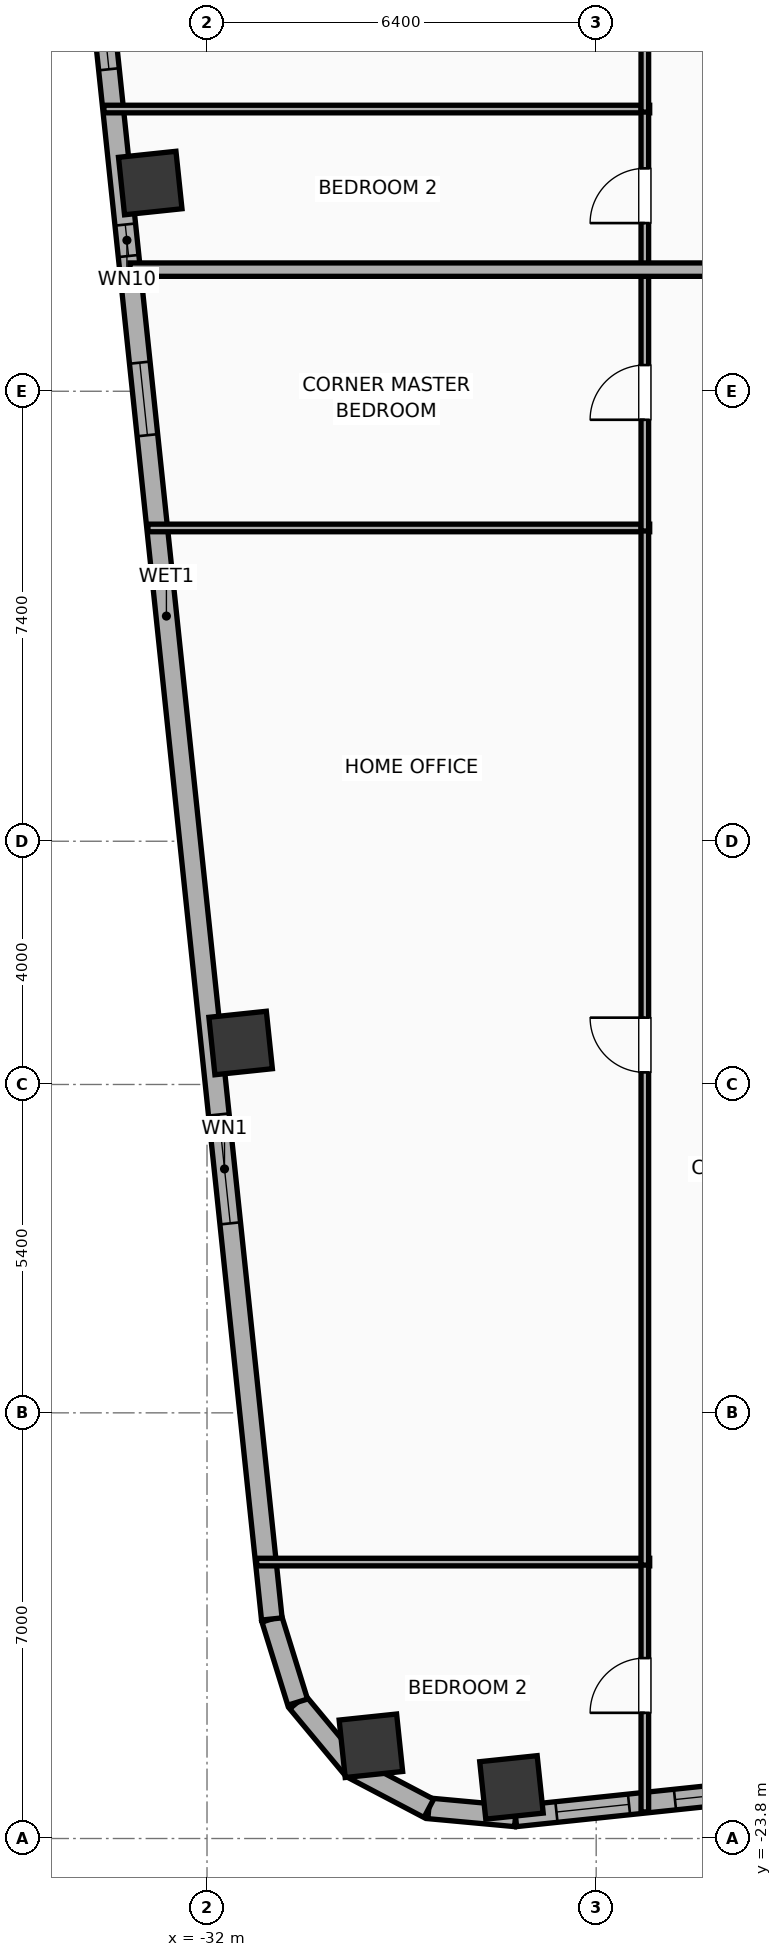
"""IFC4 building model, lengths in metres.
Left out: names, types, materials, properties, quantities, classifications, styles, units other than length and angle.
Written with IfcOpenShell. Run it as: python <this file> out.ifc"""

import sys

from ifc_helpers import new_model, si_unit, direction, frame, frame_2d, origin, origin_2d, place, context, subcontext, project, spatial, rectangle, hollow_rectangle, hollow_circle, extrude, element, fill, save


model = new_model("IFC4")
c1 = context("Model", 3, precision=1e-05, world=origin(), true_north=direction((0.0, 1.0)))
c2 = subcontext(c1, "Body", "Model", "MODEL_VIEW")
j1 = project(units=[si_unit("LENGTHUNIT", "METRE"), si_unit("PLANEANGLEUNIT", "RADIAN")], contexts=[c1])
p1 = place(None, origin())
s1 = spatial("IfcSite", under=j1, at=p1, CompositionType="ELEMENT")
p2 = place(p1, origin())
s2 = spatial("IfcBuilding", under=s1, at=p2, CompositionType="ELEMENT")
p3 = place(p2, frame((0.0, 0.0, 175.5)))
s3 = spatial("IfcBuildingStorey", under=s2, at=p3, CompositionType="ELEMENT", Elevation=175.5)
for number, where, z_axis, x_axis in (
    (1, (-26.993, -22.959, 0.0), (0.0, 0.0, 1.0), (0.995, 0.105, 0.0)),
    (2, (-32.934, 3.424, 0.0), (0.0, 0.0, 1.0), (0.995, 0.105, 0.0)),
    (3, (-31.447, -10.718, 0.0), (0.0, 0.0, 1.0), (0.995, 0.105, 0.0)),
):
    element("IfcColumn", number, at=place(p3, frame(where, z_axis=z_axis, x_axis=x_axis)), inside=s3, PredefinedType="COLUMN", context=c2, shape_type="SweptSolid", body=[
        extrude(hollow_rectangle(XDim=0.95, YDim=0.95, WallThickness=0.032, at=origin_2d()), origin(), (0.0, 0.0, 1.0), 3.9),
    ])
p4 = place(p3, frame((-29.305, -22.275, 0.0), z_axis=(0.0, 0.0, 1.0), x_axis=(0.994521895368, 0.104528463268, 0.0)))
e4 = element("IfcColumn", 4, at=p4, inside=s3, PredefinedType="COLUMN", context=c2, shape_type="SweptSolid", body=[
    extrude(hollow_circle(Radius=0.475, WallThickness=0.032, at=origin_2d()), origin(), (0.0, 0.0, 1.0), 3.9),
])
p5 = place(p3, frame((24.756, -18.003, 0.0), z_axis=(0.0, 0.0, 1.0), x_axis=(-0.99452160744, -0.104531202687, 0.0)))
e5 = element("IfcWall", 5, at=p5, inside=s3, PredefinedType="ELEMENTEDWALL", context=c2, shape_type="SweptSolid", body=[
    extrude(rectangle(XDim=51.967, YDim=0.34, at=frame_2d((25.983, 0.0))), origin(), (0.0, 0.0, 1.0), 3.65),
])
p6 = place(p5, frame((25.633, 0.0, 0.75)))
e6 = element("IfcOpeningElement", 6, at=p6, cuts=e5, PredefinedType="OPENING", context=c2, shape_type="SweptSolid", body=[
    extrude(rectangle(XDim=2.4, YDim=2.1, at=frame_2d((1.2, 1.05))), frame((0.0, 0.18, 0.0), z_axis=(0.0, -1.0, 0.0), x_axis=(1.0, 0.0, 0.0)), (0.0, 0.0, 1.0), 0.36),
])
p7 = place(p5, frame((42.318, 0.0, 0.75)))
e7 = element("IfcOpeningElement", 7, at=p7, cuts=e5, PredefinedType="OPENING", context=c2, shape_type="SweptSolid", body=[
    extrude(rectangle(XDim=1.2, YDim=2.05, at=frame_2d((0.6, 1.025))), frame((0.0, 0.18, 0.0), z_axis=(0.0, -1.0, 0.0), x_axis=(1.0, 0.0, 0.0)), (0.0, 0.0, 1.0), 0.36),
])
p8 = place(p5, frame((34.121, 0.0, 0.75)))
e8 = element("IfcOpeningElement", 8, at=p8, cuts=e5, PredefinedType="OPENING", context=c2, shape_type="SweptSolid", body=[
    extrude(rectangle(XDim=1.2, YDim=2.05, at=frame_2d((0.6, 1.025))), frame((0.0, 0.18, 0.0), z_axis=(0.0, -1.0, 0.0), x_axis=(1.0, 0.0, 0.0)), (0.0, 0.0, 1.0), 0.36),
])
p9 = place(p5, frame((37.092, 0.0, 0.75)))
e9 = element("IfcOpeningElement", 9, at=p9, cuts=e5, PredefinedType="OPENING", context=c2, shape_type="SweptSolid", body=[
    extrude(rectangle(XDim=1.2, YDim=2.05, at=frame_2d((0.6, 1.025))), frame((0.0, 0.18, 0.0), z_axis=(0.0, -1.0, 0.0), x_axis=(1.0, 0.0, 0.0)), (0.0, 0.0, 1.0), 0.36),
])
p10 = place(p5, frame((14.359, 0.0, 0.75)))
e10 = element("IfcOpeningElement", 10, at=p10, cuts=e5, PredefinedType="OPENING", context=c2, shape_type="SweptSolid", body=[
    extrude(rectangle(XDim=1.2, YDim=2.05, at=frame_2d((0.6, 1.025))), frame((0.0, 0.18, 0.0), z_axis=(0.0, -1.0, 0.0), x_axis=(1.0, 0.0, 0.0)), (0.0, 0.0, 1.0), 0.36),
])
p11 = place(p5, frame((11.388, 0.0, 0.75)))
e11 = element("IfcOpeningElement", 11, at=p11, cuts=e5, PredefinedType="OPENING", context=c2, shape_type="SweptSolid", body=[
    extrude(rectangle(XDim=1.2, YDim=2.05, at=frame_2d((0.6, 1.025))), frame((0.0, 0.18, 0.0), z_axis=(0.0, -1.0, 0.0), x_axis=(1.0, 0.0, 0.0)), (0.0, 0.0, 1.0), 0.36),
])
p12 = place(p5, frame((8.332, 0.0, 0.75)))
e12 = element("IfcOpeningElement", 12, at=p12, cuts=e5, PredefinedType="OPENING", context=c2, shape_type="SweptSolid", body=[
    extrude(rectangle(XDim=1.2, YDim=2.05, at=frame_2d((0.6, 1.025))), frame((0.0, 0.18, 0.0), z_axis=(0.0, -1.0, 0.0), x_axis=(1.0, 0.0, 0.0)), (0.0, 0.0, 1.0), 0.36),
])
p13 = place(p5, frame((5.331, 0.0, 0.75)))
e13 = element("IfcOpeningElement", 13, at=p13, cuts=e5, PredefinedType="OPENING", context=c2, shape_type="SweptSolid", body=[
    extrude(rectangle(XDim=1.2, YDim=2.05, at=frame_2d((0.6, 1.025))), frame((0.0, 0.18, 0.0), z_axis=(0.0, -1.0, 0.0), x_axis=(1.0, 0.0, 0.0)), (0.0, 0.0, 1.0), 0.36),
])
p14 = place(p5, frame((29.313, 0.0, 0.75)))
e14 = element("IfcOpeningElement", 14, at=p14, cuts=e5, PredefinedType="OPENING", context=c2, shape_type="SweptSolid", body=[
    extrude(rectangle(XDim=1.2, YDim=2.05, at=frame_2d((0.6, 1.025))), frame((0.0, 0.18, 0.0), z_axis=(0.0, -1.0, 0.0), x_axis=(1.0, 0.0, 0.0)), (0.0, 0.0, 1.0), 0.36),
])
p15 = place(p5, frame((22.248, 0.0, 0.75)))
e15 = element("IfcOpeningElement", 15, at=p15, cuts=e5, PredefinedType="OPENING", context=c2, shape_type="SweptSolid", body=[
    extrude(rectangle(XDim=1.2, YDim=2.05, at=frame_2d((0.6, 1.025))), frame((0.0, 0.18, 0.0), z_axis=(0.0, -1.0, 0.0), x_axis=(1.0, 0.0, 0.0)), (0.0, 0.0, 1.0), 0.36),
])
p16 = place(p5, frame((18.186, 0.0, 0.75)))
e16 = element("IfcOpeningElement", 16, at=p16, cuts=e5, PredefinedType="OPENING", context=c2, shape_type="SweptSolid", body=[
    extrude(rectangle(XDim=1.2, YDim=2.05, at=frame_2d((0.6, 1.025))), frame((0.0, 0.18, 0.0), z_axis=(0.0, -1.0, 0.0), x_axis=(1.0, 0.0, 0.0)), (0.0, 0.0, 1.0), 0.36),
])
p17 = place(p5, frame((48.13, 0.0, 0.75)))
e17 = element("IfcOpeningElement", 17, at=p17, cuts=e5, PredefinedType="OPENING", context=c2, shape_type="SweptSolid", body=[
    extrude(rectangle(XDim=1.2, YDim=2.05, at=frame_2d((0.6, 1.025))), frame((0.0, 0.18, 0.0), z_axis=(0.0, -1.0, 0.0), x_axis=(1.0, 0.0, 0.0)), (0.0, 0.0, 1.0), 0.36),
])
p18 = place(p5, frame((50.09, 0.0, 0.75)))
e18 = element("IfcOpeningElement", 18, at=p18, cuts=e5, PredefinedType="OPENING", context=c2, shape_type="SweptSolid", body=[
    extrude(rectangle(XDim=1.2, YDim=2.05, at=frame_2d((0.6, 1.025))), frame((0.0, 0.18, 0.0), z_axis=(0.0, -1.0, 0.0), x_axis=(1.0, 0.0, 0.0)), (0.0, 0.0, 1.0), 0.36),
])
p19 = place(p5, frame((0.718, 0.0, 0.75)))
e19 = element("IfcOpeningElement", 19, at=p19, cuts=e5, PredefinedType="OPENING", context=c2, shape_type="SweptSolid", body=[
    extrude(rectangle(XDim=1.2, YDim=2.05, at=frame_2d((0.6, 1.025))), frame((0.0, 0.18, 0.0), z_axis=(0.0, -1.0, 0.0), x_axis=(1.0, 0.0, 0.0)), (0.0, 0.0, 1.0), 0.36),
])
p20 = place(p3, frame((-26.926, -23.435, 0.0), z_axis=(0.0, 0.0, 1.0), x_axis=(-0.995800460351, 0.091550222087, 0.0)))
e20 = element("IfcWall", 20, at=p20, inside=s3, PredefinedType="ELEMENTEDWALL", context=c2, shape_type="SweptSolid", body=[
    extrude(rectangle(XDim=1.432, YDim=0.34, at=frame_2d((0.716, 0.0))), origin(), (0.0, 0.0, 1.0), 3.65),
])
p21 = place(p3, frame((-28.352, -23.304, 0.0), z_axis=(0.0, 0.0, 1.0), x_axis=(-0.884989312682, 0.465611336243, 0.0)))
e21 = element("IfcWall", 21, at=p21, inside=s3, PredefinedType="ELEMENTEDWALL", context=c2, shape_type="SweptSolid", body=[
    extrude(rectangle(XDim=1.415, YDim=0.34, at=frame_2d((0.708, 0.0))), origin(), (0.0, 0.0, 1.0), 3.65),
])
p22 = place(p3, frame((-29.605, -22.645, 0.0), z_axis=(0.0, 0.0, 1.0), x_axis=(-0.639437361921, 0.768843196093, 0.0)))
e22 = element("IfcWall", 22, at=p22, inside=s3, PredefinedType="ELEMENTEDWALL", context=c2, shape_type="SweptSolid", body=[
    extrude(rectangle(XDim=1.415, YDim=0.34, at=frame_2d((0.708, 0.0))), origin(), (0.0, 0.0, 1.0), 3.65),
])
p23 = place(p3, frame((-30.51, -21.557, 0.0), z_axis=(0.0, 0.0, 1.0), x_axis=(-0.296624409546, 0.9549942197, 0.0)))
e23 = element("IfcWall", 23, at=p23, inside=s3, PredefinedType="ELEMENTEDWALL", context=c2, shape_type="SweptSolid", body=[
    extrude(rectangle(XDim=1.432, YDim=0.34, at=frame_2d((0.716, 0.0))), origin(), (0.0, 0.0, 1.0), 3.65),
])
p24 = place(p3, frame((-30.934, -20.19, 0.0), z_axis=(0.0, 0.0, 1.0), x_axis=(-0.10452691388, 0.994522058214, 0.0)))
e24 = element("IfcWall", 24, at=p24, inside=s3, PredefinedType="ELEMENTEDWALL", context=c2, shape_type="SweptSolid", body=[
    extrude(rectangle(XDim=33.167, YDim=0.34, at=frame_2d((16.583, 0.0))), origin(), (0.0, 0.0, 1.0), 3.65),
])
p25 = place(p24, frame((6.542, 0.0, 0.75)))
e25 = element("IfcOpeningElement", 25, at=p25, cuts=e24, PredefinedType="OPENING", context=c2, shape_type="SweptSolid", body=[
    extrude(rectangle(XDim=1.8, YDim=2.1, at=frame_2d((0.9, 1.05))), frame((0.0, 0.18, 0.0), z_axis=(0.0, -1.0, 0.0), x_axis=(1.0, 0.0, 0.0)), (0.0, 0.0, 1.0), 0.36),
])
p26 = place(p24, frame((25.625, 0.0, 0.75)))
e26 = element("IfcOpeningElement", 26, at=p26, cuts=e24, PredefinedType="OPENING", context=c2, shape_type="SweptSolid", body=[
    extrude(rectangle(XDim=1.8, YDim=2.1, at=frame_2d((0.9, 1.05))), frame((0.0, 0.18, 0.0), z_axis=(0.0, -1.0, 0.0), x_axis=(1.0, 0.0, 0.0)), (0.0, 0.0, 1.0), 0.36),
])
p27 = place(p24, frame((19.574, 0.0, 0.75)))
e27 = element("IfcOpeningElement", 27, at=p27, cuts=e24, PredefinedType="OPENING", context=c2, shape_type="SweptSolid", body=[
    extrude(rectangle(XDim=1.2, YDim=2.05, at=frame_2d((0.6, 1.025))), frame((0.0, 0.18, 0.0), z_axis=(0.0, -1.0, 0.0), x_axis=(1.0, 0.0, 0.0)), (0.0, 0.0, 1.0), 0.36),
])
p28 = place(p24, frame((22.537, 0.0, 0.75)))
e28 = element("IfcOpeningElement", 28, at=p28, cuts=e24, PredefinedType="OPENING", context=c2, shape_type="SweptSolid", body=[
    extrude(rectangle(XDim=0.52, YDim=2.05, at=frame_2d((0.26, 1.025))), frame((0.0, 0.18, 0.0), z_axis=(0.0, -1.0, 0.0), x_axis=(1.0, 0.0, 0.0)), (0.0, 0.0, 1.0), 0.36),
])
p29 = place(p3, frame((-31.183, -19.254, 0.0), z_axis=(0.0, 0.0, 1.0), x_axis=(1.0, 0.0, 0.0)))
e29 = element("IfcWall", 29, at=p29, inside=s3, PredefinedType="PARTITIONING", context=c2, shape_type="SweptSolid", body=[
    extrude(rectangle(XDim=6.463, YDim=0.125, at=frame_2d((3.232, 0.0))), origin(), (0.0, 0.0, 1.0), 3.65),
])
p30 = place(p3, frame((-32.971, -2.248, 0.0), z_axis=(0.0, 0.0, 1.0), x_axis=(1.0, 0.0, 0.0)))
e30 = element("IfcWall", 30, at=p30, inside=s3, PredefinedType="PARTITIONING", context=c2, shape_type="SweptSolid", body=[
    extrude(rectangle(XDim=8.251, YDim=0.125, at=frame_2d((4.125, 0.0))), origin(), (0.0, 0.0, 1.0), 3.65),
])
p31 = place(p3, frame((-24.8, -23.363, 0.0), z_axis=(0.0, 0.0, 1.0), x_axis=(0.0, 1.0, 0.0)))
e31 = element("IfcWall", 31, at=p31, inside=s3, PredefinedType="PARTITIONING", context=c2, shape_type="SweptSolid", body=[
    extrude(rectangle(XDim=4.158, YDim=0.125, at=frame_2d((2.079, 0.0))), origin(), (0.0, 0.0, 1.0), 3.65),
])
p32 = place(p31, frame((1.629, 0.0, 0.0)))
e32 = element("IfcOpeningElement", 32, at=p32, cuts=e31, PredefinedType="OPENING", context=c2, shape_type="SweptSolid", body=[
    extrude(rectangle(XDim=0.9, YDim=2.05, at=frame_2d((0.45, 1.025))), frame((0.0, 0.073, 0.0), z_axis=(0.0, -1.0, 0.0), x_axis=(1.0, 0.0, 0.0)), (0.0, 0.0, 1.0), 0.145),
])
p33 = place(p3, frame((-24.8, -19.304, 0.0), z_axis=(0.0, 0.0, 1.0), x_axis=(0.0, 1.0, 0.0)))
e33 = element("IfcWall", 33, at=p33, inside=s3, PredefinedType="PARTITIONING", context=c2, shape_type="SweptSolid", body=[
    extrude(rectangle(XDim=17.106, YDim=0.125, at=frame_2d((8.553, 0.0))), origin(), (0.0, 0.0, 1.0), 3.65),
])
p34 = place(p33, frame((8.103, 0.0, 0.0)))
e34 = element("IfcOpeningElement", 34, at=p34, cuts=e33, PredefinedType="OPENING", context=c2, shape_type="SweptSolid", body=[
    extrude(rectangle(XDim=0.9, YDim=2.05, at=frame_2d((0.45, 1.025))), frame((0.0, 0.073, 0.0), z_axis=(0.0, -1.0, 0.0), x_axis=(1.0, 0.0, 0.0)), (0.0, 0.0, 1.0), 0.145),
])
p35 = place(p3, frame((-24.8, -2.298, 0.0), z_axis=(0.0, 0.0, 1.0), x_axis=(0.0, 1.0, 0.0)))
e35 = element("IfcWall", 35, at=p35, inside=s3, PredefinedType="PARTITIONING", context=c2, shape_type="SweptSolid", body=[
    extrude(rectangle(XDim=4.361, YDim=0.125, at=frame_2d((2.18, 0.0))), origin(), (0.0, 0.0, 1.0), 3.65),
])
p36 = place(p35, frame((1.829, 0.0, 0.0)))
e36 = element("IfcOpeningElement", 36, at=p36, cuts=e35, PredefinedType="OPENING", context=c2, shape_type="SweptSolid", body=[
    extrude(rectangle(XDim=0.9, YDim=2.05, at=frame_2d((0.45, 1.025))), frame((0.0, 0.073, 0.0), z_axis=(0.0, -1.0, 0.0), x_axis=(1.0, 0.0, 0.0)), (0.0, 0.0, 1.0), 0.145),
])
p37 = place(p3, frame((-33.695, 4.641, 0.0), z_axis=(0.0, 0.0, 1.0), x_axis=(1.0, 0.0, 0.0)))
e37 = element("IfcWall", 37, at=p37, inside=s3, PredefinedType="PARTITIONING", context=c2, shape_type="SweptSolid", body=[
    extrude(rectangle(XDim=8.975, YDim=0.125, at=frame_2d((4.487, 0.0))), origin(), (0.0, 0.0, 1.0), 3.04),
])
p38 = place(p3, frame((-24.8, 1.938, 0.0), z_axis=(0.0, 0.0, 1.0), x_axis=(0.0, 1.0, 0.0)))
e38 = element("IfcWall", 38, at=p38, inside=s3, PredefinedType="PARTITIONING", context=c2, shape_type="SweptSolid", body=[
    extrude(rectangle(XDim=2.753, YDim=0.125, at=frame_2d((1.377, 0.0))), origin(), (0.0, 0.0, 1.0), 3.65),
])
p39 = place(p38, frame((0.828, 0.0, 0.0)))
e39 = element("IfcOpeningElement", 39, at=p39, cuts=e38, PredefinedType="OPENING", context=c2, shape_type="SweptSolid", body=[
    extrude(rectangle(XDim=0.9, YDim=2.05, at=frame_2d((0.45, 1.025))), frame((0.0, 0.073, 0.0), z_axis=(0.0, -1.0, 0.0), x_axis=(1.0, 0.0, 0.0)), (0.0, 0.0, 1.0), 0.145),
])
p40 = place(p3, frame((-24.8, 4.591, 0.0), z_axis=(0.0, 0.0, 1.0), x_axis=(0.0, 1.0, 0.0)))
e40 = element("IfcWall", 40, at=p40, inside=s3, PredefinedType="PARTITIONING", context=c2, shape_type="SweptSolid", body=[
    extrude(rectangle(XDim=10.579, YDim=0.125, at=frame_2d((5.29, 0.0))), origin(), (0.0, 0.0, 1.0), 3.65),
])
p41 = place(p40, frame((4.84, 0.0, 0.0)))
e41 = element("IfcOpeningElement", 41, at=p41, cuts=e40, PredefinedType="OPENING", context=c2, shape_type="SweptSolid", body=[
    extrude(rectangle(XDim=0.9, YDim=2.05, at=frame_2d((0.45, 1.025))), frame((0.0, 0.073, 0.0), z_axis=(0.0, -1.0, 0.0), x_axis=(1.0, 0.0, 0.0)), (0.0, 0.0, 1.0), 0.145),
])
p42 = place(p3, frame((-19.97, 2.0, 0.0), z_axis=(0.0, 0.0, 1.0), x_axis=(-1.0, 0.0, 0.0)))
e42 = element("IfcWall", 42, at=p42, inside=s3, PredefinedType="PARTITIONING", context=c2, shape_type="SweptSolid", body=[
    extrude(rectangle(XDim=13.297, YDim=0.22, at=frame_2d((6.648, 0.0))), origin(), (0.0, 0.0, 1.0), 3.65),
])
p43 = place(p25, origin())
e43 = element("IfcWindow", 43, at=p43, inside=s3, PartitioningType="SINGLE_PANEL", PredefinedType="WINDOW", context=c2, shape_type="SweptSolid", body=[
    extrude(rectangle(XDim=1.8, YDim=2.1, at=frame_2d((0.9, 1.05))), frame((0.0, 0.03, 0.0), z_axis=(0.0, -1.0, 0.0), x_axis=(1.0, 0.0, 0.0)), (0.0, 0.0, 1.0), 0.06),
])
fill(e25, e43)
p44 = place(p26, origin())
e44 = element("IfcWindow", 44, at=p44, inside=s3, PartitioningType="SINGLE_PANEL", PredefinedType="WINDOW", context=c2, shape_type="SweptSolid", body=[
    extrude(rectangle(XDim=1.8, YDim=2.1, at=frame_2d((0.9, 1.05))), frame((0.0, 0.03, 0.0), z_axis=(0.0, -1.0, 0.0), x_axis=(1.0, 0.0, 0.0)), (0.0, 0.0, 1.0), 0.06),
])
fill(e26, e44)
p45 = place(p17, origin())
e45 = element("IfcWindow", 45, at=p45, inside=s3, PartitioningType="SINGLE_PANEL", PredefinedType="WINDOW", context=c2, shape_type="SweptSolid", body=[
    extrude(rectangle(XDim=1.2, YDim=2.05, at=frame_2d((0.6, 1.025))), frame((0.0, 0.03, 0.0), z_axis=(0.0, -1.0, 0.0), x_axis=(1.0, 0.0, 0.0)), (0.0, 0.0, 1.0), 0.06),
])
fill(e17, e45)
p46 = place(p27, origin())
e46 = element("IfcWindow", 46, at=p46, inside=s3, PartitioningType="SINGLE_PANEL", PredefinedType="WINDOW", context=c2, shape_type="SweptSolid", body=[
    extrude(rectangle(XDim=1.2, YDim=2.05, at=frame_2d((0.6, 1.025))), frame((0.0, 0.03, 0.0), z_axis=(0.0, -1.0, 0.0), x_axis=(1.0, 0.0, 0.0)), (0.0, 0.0, 1.0), 0.06),
])
fill(e27, e46)
p47 = place(p18, origin())
e47 = element("IfcWindow", 47, at=p47, inside=s3, PartitioningType="SINGLE_PANEL", PredefinedType="WINDOW", context=c2, shape_type="SweptSolid", body=[
    extrude(rectangle(XDim=1.2, YDim=2.05, at=frame_2d((0.6, 1.025))), frame((0.0, 0.03, 0.0), z_axis=(0.0, -1.0, 0.0), x_axis=(1.0, 0.0, 0.0)), (0.0, 0.0, 1.0), 0.06),
])
fill(e18, e47)
p48 = place(p28, origin())
e48 = element("IfcWindow", 48, at=p48, inside=s3, PartitioningType="SINGLE_PANEL", PredefinedType="WINDOW", context=c2, shape_type="SweptSolid", body=[
    extrude(rectangle(XDim=0.52, YDim=2.05, at=frame_2d((0.26, 1.025))), frame((0.0, 0.03, 0.0), z_axis=(0.0, -1.0, 0.0), x_axis=(1.0, 0.0, 0.0)), (0.0, 0.0, 1.0), 0.06),
])
fill(e28, e48)
p49 = place(p32, origin())
e49 = element("IfcDoor", 49, at=p49, inside=s3, OperationType="SINGLE_SWING_LEFT", PredefinedType="DOOR", context=c2, shape_type="SweptSolid", body=[
    extrude(rectangle(XDim=0.9, YDim=2.05, at=frame_2d((0.45, 1.025))), frame((0.0, 0.025, 0.0), z_axis=(0.0, -1.0, 0.0), x_axis=(1.0, 0.0, 0.0)), (0.0, 0.0, 1.0), 0.05),
])
fill(e32, e49)
p50 = place(p34, origin())
e50 = element("IfcDoor", 50, at=p50, inside=s3, OperationType="SINGLE_SWING_RIGHT", PredefinedType="DOOR", context=c2, shape_type="SweptSolid", body=[
    extrude(rectangle(XDim=0.9, YDim=2.05, at=frame_2d((0.45, 1.025))), frame((0.0, 0.025, 0.0), z_axis=(0.0, -1.0, 0.0), x_axis=(1.0, 0.0, 0.0)), (0.0, 0.0, 1.0), 0.05),
])
fill(e34, e50)
p51 = place(p36, origin())
e51 = element("IfcDoor", 51, at=p51, inside=s3, OperationType="SINGLE_SWING_LEFT", PredefinedType="DOOR", context=c2, shape_type="SweptSolid", body=[
    extrude(rectangle(XDim=0.9, YDim=2.05, at=frame_2d((0.45, 1.025))), frame((0.0, 0.025, 0.0), z_axis=(0.0, -1.0, 0.0), x_axis=(1.0, 0.0, 0.0)), (0.0, 0.0, 1.0), 0.05),
])
fill(e36, e51)
p52 = place(p39, origin())
e52 = element("IfcDoor", 52, at=p52, inside=s3, OperationType="SINGLE_SWING_LEFT", PredefinedType="DOOR", context=c2, shape_type="SweptSolid", body=[
    extrude(rectangle(XDim=0.9, YDim=2.05, at=frame_2d((0.45, 1.025))), frame((0.0, 0.025, 0.0), z_axis=(0.0, -1.0, 0.0), x_axis=(1.0, 0.0, 0.0)), (0.0, 0.0, 1.0), 0.05),
])
fill(e39, e52)
save(model, sys.argv[1])
